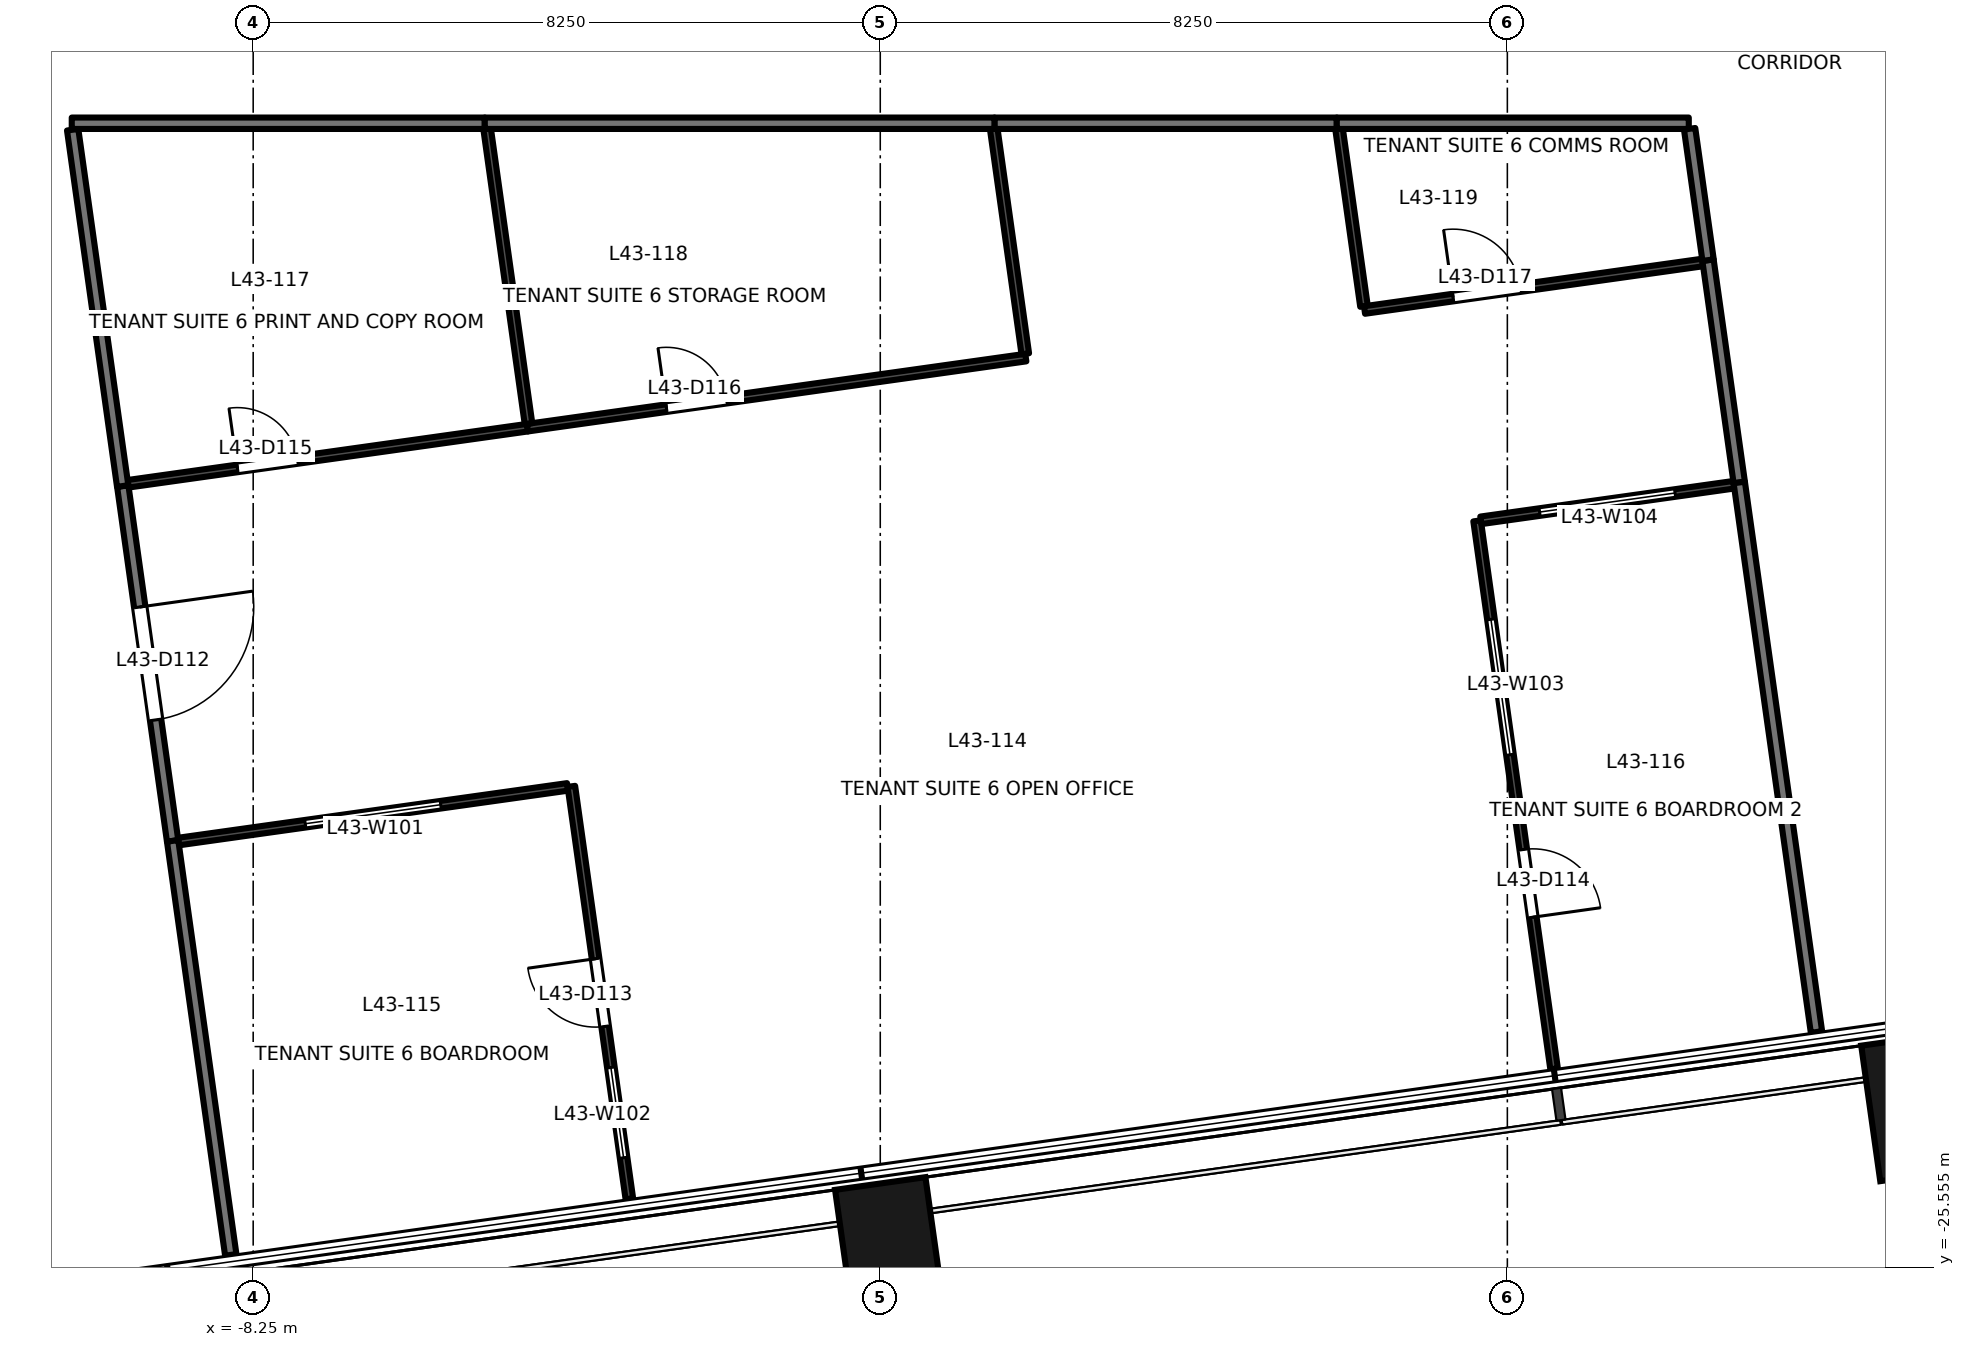
"""IFC4 building model, lengths in metres.
Left out: names, types, materials, properties, quantities, classifications, styles, units other than length and angle.
Written with IfcOpenShell. Run it as: python <this file> out.ifc"""

import sys

from ifc_helpers import new_model, si_unit, direction, frame, frame_2d, origin, origin_2d, place, context, subcontext, project, spatial, rectangle, extrude, element, fill, save


model = new_model("IFC4")
c1 = context("Model", 3, precision=1e-05, world=origin(), true_north=direction((0.0, 1.0)))
c2 = subcontext(c1, "Body", "Model", "MODEL_VIEW")
j1 = project(units=[si_unit("LENGTHUNIT", "METRE"), si_unit("PLANEANGLEUNIT", "RADIAN")], contexts=[c1])
p1 = place(None, origin())
s1 = spatial("IfcSite", under=j1, at=p1, CompositionType="ELEMENT")
p2 = place(p1, origin())
s2 = spatial("IfcBuilding", under=s1, at=p2, CompositionType="ELEMENT")
p3 = place(p2, frame((0.0, 0.0, 188.0)))
s3 = spatial("IfcBuildingStorey", under=s2, at=p3, CompositionType="ELEMENT", Elevation=188.0)
for number, where, z_axis, x_axis in (
    (1, (0.125, -25.34, -0.2), (0.0, 0.0, 1.0), (0.99, 0.139, 0.0)),
    (2, (13.625, -23.443, -0.2), (0.0, 0.0, 1.0), (0.99, 0.139, 0.0)),
):
    element("IfcColumn", number, at=place(p3, frame(where, z_axis=z_axis, x_axis=x_axis)), inside=s3, PredefinedType="COLUMN", context=c2, shape_type="SweptSolid", body=[
        extrude(rectangle(XDim=1.2, YDim=1.8, at=origin_2d()), origin(), (0.0, 0.0, 1.0), 3.9),
    ])
p4 = place(p3, frame((-9.966, -15.273, 0.0), z_axis=(0.0, 0.0, 1.0), x_axis=(0.139137407344, -0.990273084496, 0.0)))
e3 = element("IfcWall", 3, at=p4, inside=s3, PredefinedType="PARTITIONING", context=c2, shape_type="SweptSolid", body=[
    extrude(rectangle(XDim=4.715, YDim=0.15, at=frame_2d((2.357, 0.0))), origin(), (0.0, 0.0, 1.0), 3.7),
])
p5 = place(p4, frame((1.607, 0.0, 0.0)))
e4 = element("IfcOpeningElement", 4, at=p5, cuts=e3, PredefinedType="OPENING", context=c2, shape_type="SweptSolid", body=[
    extrude(rectangle(XDim=1.5, YDim=2.1, at=frame_2d((0.75, 1.05))), frame((0.0, 0.085, 0.0), z_axis=(0.0, -1.0, 0.0), x_axis=(1.0, 0.0, 0.0)), (0.0, 0.0, 1.0), 0.171),
])
p6 = place(p3, frame((6.006, -10.5, 0.0), z_axis=(0.0, 0.0, 1.0), x_axis=(-1.0, 0.0, 0.0)))
e5 = element("IfcWall", 5, at=p6, inside=s3, PredefinedType="PARTITIONING", context=c2, shape_type="SweptSolid", body=[
    extrude(rectangle(XDim=4.504, YDim=0.15, at=frame_2d((2.252, 0.0))), origin(), (0.0, 0.0, 1.0), 2.9),
])
p7 = place(p3, frame((11.301, -15.226, 0.0), z_axis=(0.0, 0.0, 1.0), x_axis=(-0.139233295347, 0.990259607107, 0.0)))
e6 = element("IfcWall", 6, at=p7, inside=s3, PredefinedType="PARTITIONING", context=c2, shape_type="SweptSolid", body=[
    extrude(rectangle(XDim=2.953, YDim=0.15, at=frame_2d((1.477, 0.0))), origin(), (0.0, 0.0, 1.0), 3.7),
])
p8 = place(p3, frame((-9.31, -19.941, 0.0), z_axis=(0.0, 0.0, 1.0), x_axis=(0.139103174181, -0.990277893792, 0.0)))
e7 = element("IfcWall", 7, at=p8, inside=s3, PredefinedType="PARTITIONING", context=c2, shape_type="SweptSolid", body=[
    extrude(rectangle(XDim=5.5, YDim=0.15, at=frame_2d((2.75, 0.0))), origin(), (0.0, 0.0, 1.0), 2.8),
])
p9 = place(p3, frame((12.317, -22.456, 0.0), z_axis=(0.0, 0.0, 1.0), x_axis=(-0.139141087095, 0.990272567469, 0.0)))
e8 = element("IfcWall", 8, at=p9, inside=s3, PredefinedType="PARTITIONING", context=c2, shape_type="SweptSolid", body=[
    extrude(rectangle(XDim=7.301, YDim=0.15, at=frame_2d((3.65, 0.0))), origin(), (0.0, 0.0, 1.0), 3.7),
])
p10 = place(p3, frame((-10.625, -10.585, 0.0), z_axis=(0.0, 0.0, 1.0), x_axis=(0.138987741071, -0.990294101685, 0.0)))
e9 = element("IfcWall", 9, at=p10, inside=s3, PredefinedType="PARTITIONING", context=c2, shape_type="SweptSolid", body=[
    extrude(rectangle(XDim=4.734, YDim=0.15, at=frame_2d((2.367, 0.0))), origin(), (0.0, 0.0, 1.0), 3.7),
])
p11 = place(p3, frame((-5.203, -10.5, 0.0), z_axis=(0.0, 0.0, 1.0), x_axis=(-1.0, 0.0, 0.0)))
e10 = element("IfcWall", 10, at=p11, inside=s3, PredefinedType="PARTITIONING", context=c2, shape_type="SweptSolid", body=[
    extrude(rectangle(XDim=5.434, YDim=0.15, at=frame_2d((2.717, 0.0))), origin(), (0.0, 0.0, 1.0), 2.8),
])
p12 = place(p3, frame((1.502, -10.5, 0.0), z_axis=(0.0, 0.0, 1.0), x_axis=(-1.0, 0.0, 0.0)))
e11 = element("IfcWall", 11, at=p12, inside=s3, PredefinedType="PARTITIONING", context=c2, shape_type="SweptSolid", body=[
    extrude(rectangle(XDim=6.705, YDim=0.15, at=frame_2d((3.353, 0.0))), origin(), (0.0, 0.0, 1.0), 2.9),
])
p13 = place(p3, frame((10.637, -10.5, 0.0), z_axis=(0.0, 0.0, 1.0), x_axis=(-1.0, 0.0, 0.0)))
e12 = element("IfcWall", 12, at=p13, inside=s3, PredefinedType="PARTITIONING", context=c2, shape_type="SweptSolid", body=[
    extrude(rectangle(XDim=4.631, YDim=0.15, at=frame_2d((2.315, 0.0))), origin(), (0.0, 0.0, 1.0), 3.0),
])
p14 = place(p3, frame((10.891, -12.301, 0.0), z_axis=(0.0, 0.0, 1.0), x_axis=(-0.139344862723, 0.990243914009, 0.0)))
e13 = element("IfcWall", 13, at=p14, inside=s3, PredefinedType="PARTITIONING", context=c2, shape_type="SweptSolid", body=[
    extrude(rectangle(XDim=1.745, YDim=0.15, at=frame_2d((0.873, 0.0))), origin(), (0.0, 0.0, 1.0), 3.7),
])
p15 = place(p3, frame((-4.114, -19.231, 0.0), z_axis=(0.0, 0.0, 1.0), x_axis=(-0.990279259335, -0.139093452508, 0.0)))
e14 = element("IfcWall", 14, at=p15, inside=s3, PredefinedType="PARTITIONING", context=c2, shape_type="SweptSolid", body=[
    extrude(rectangle(XDim=5.169, YDim=0.1, at=frame_2d((2.584, 0.0))), origin(), (0.0, 0.0, 1.0), 2.8),
])
p16 = place(p15, frame((1.685, 0.0, 0.9)))
e15 = element("IfcOpeningElement", 15, at=p16, cuts=e14, PredefinedType="OPENING", context=c2, shape_type="SweptSolid", body=[
    extrude(rectangle(XDim=1.8, YDim=1.2, at=frame_2d((0.9, 0.6))), frame((0.0, 0.061, 0.0), z_axis=(0.0, -1.0, 0.0), x_axis=(1.0, 0.0, 0.0)), (0.0, 0.0, 1.0), 0.121),
])
p17 = place(p3, frame((-3.301, -24.65, 0.0), z_axis=(0.0, 0.0, 1.0), x_axis=(-0.139243907894, 0.990258114894, 0.0)))
e16 = element("IfcWall", 16, at=p17, inside=s3, PredefinedType="PARTITIONING", context=c2, shape_type="SweptSolid", body=[
    extrude(rectangle(XDim=5.479, YDim=0.1, at=frame_2d((2.74, 0.0))), origin(), (0.0, 0.0, 1.0), 3.7),
])
p18 = place(p17, frame((2.29, 0.0, 0.0)))
e17 = element("IfcOpeningElement", 17, at=p18, cuts=e16, PredefinedType="OPENING", context=c2, shape_type="SweptSolid", body=[
    extrude(rectangle(XDim=0.9, YDim=2.1, at=frame_2d((0.45, 1.05))), frame((0.0, 0.061, 0.0), z_axis=(0.0, -1.0, 0.0), x_axis=(1.0, 0.0, 0.0)), (0.0, 0.0, 1.0), 0.121),
])
p19 = place(p17, frame((0.545, 0.0, 0.9)))
e18 = element("IfcOpeningElement", 18, at=p19, cuts=e16, PredefinedType="OPENING", context=c2, shape_type="SweptSolid", body=[
    extrude(rectangle(XDim=1.2, YDim=1.2, at=frame_2d((0.6, 0.6))), frame((0.0, 0.061, 0.0), z_axis=(0.0, -1.0, 0.0), x_axis=(1.0, 0.0, 0.0)), (0.0, 0.0, 1.0), 0.121),
])
p20 = place(p3, frame((7.852, -15.731, 0.0), z_axis=(0.0, 0.0, 1.0), x_axis=(0.139143839005, -0.9902721808, 0.0)))
e19 = element("IfcWall", 19, at=p20, inside=s3, PredefinedType="PARTITIONING", context=c2, shape_type="SweptSolid", body=[
    extrude(rectangle(XDim=7.28, YDim=0.1, at=frame_2d((3.64, 0.0))), origin(), (0.0, 0.0, 1.0), 3.0),
])
p21 = place(p20, frame((4.366, 0.0, 0.0)))
e20 = element("IfcOpeningElement", 20, at=p21, cuts=e19, PredefinedType="OPENING", context=c2, shape_type="SweptSolid", body=[
    extrude(rectangle(XDim=0.9, YDim=2.1, at=frame_2d((0.45, 1.05))), frame((0.0, 0.061, 0.0), z_axis=(0.0, -1.0, 0.0), x_axis=(1.0, 0.0, 0.0)), (0.0, 0.0, 1.0), 0.121),
])
p22 = place(p20, frame((1.308, 0.0, 0.9)))
e21 = element("IfcOpeningElement", 21, at=p22, cuts=e19, PredefinedType="OPENING", context=c2, shape_type="SweptSolid", body=[
    extrude(rectangle(XDim=1.8, YDim=1.2, at=frame_2d((0.9, 0.6))), frame((0.0, 0.061, 0.0), z_axis=(0.0, -1.0, 0.0), x_axis=(1.0, 0.0, 0.0)), (0.0, 0.0, 1.0), 0.121),
])
p23 = place(p3, frame((11.229, -15.256, 0.0), z_axis=(0.0, 0.0, 1.0), x_axis=(-0.990256578838, -0.139254831399, 0.0)))
e22 = element("IfcWall", 22, at=p23, inside=s3, PredefinedType="PARTITIONING", context=c2, shape_type="SweptSolid", body=[
    extrude(rectangle(XDim=3.361, YDim=0.1, at=frame_2d((1.68, 0.0))), origin(), (0.0, 0.0, 1.0), 3.0),
])
p24 = place(p23, frame((0.78, 0.0, 0.9)))
e23 = element("IfcOpeningElement", 23, at=p24, cuts=e22, PredefinedType="OPENING", context=c2, shape_type="SweptSolid", body=[
    extrude(rectangle(XDim=1.8, YDim=1.2, at=frame_2d((0.9, 0.6))), frame((0.0, 0.061, 0.0), z_axis=(0.0, -1.0, 0.0), x_axis=(1.0, 0.0, 0.0)), (0.0, 0.0, 1.0), 0.121),
])
p25 = place(p3, frame((-9.895, -15.243, 0.0), z_axis=(0.0, 0.0, 1.0), x_axis=(0.99027719117, 0.139108176064, 0.0)))
e24 = element("IfcWall", 24, at=p25, inside=s3, PredefinedType="PARTITIONING", context=c2, shape_type="SweptSolid", body=[
    extrude(rectangle(XDim=5.305, YDim=0.1, at=frame_2d((2.653, 0.0))), origin(), (0.0, 0.0, 1.0), 2.8),
])
p26 = place(p25, frame((1.452, 0.0, 0.0)))
e25 = element("IfcOpeningElement", 25, at=p26, cuts=e24, PredefinedType="OPENING", context=c2, shape_type="SweptSolid", body=[
    extrude(rectangle(XDim=0.8, YDim=2.1, at=frame_2d((0.4, 1.05))), frame((0.0, 0.061, 0.0), z_axis=(0.0, -1.0, 0.0), x_axis=(1.0, 0.0, 0.0)), (0.0, 0.0, 1.0), 0.121),
])
p27 = place(p3, frame((-4.641, -14.505, 0.0), z_axis=(0.0, 0.0, 1.0), x_axis=(0.990258326755, 0.1392424012, 0.0)))
e26 = element("IfcWall", 26, at=p27, inside=s3, PredefinedType="PARTITIONING", context=c2, shape_type="SweptSolid", body=[
    extrude(rectangle(XDim=6.621, YDim=0.1, at=frame_2d((3.31, 0.0))), origin(), (0.0, 0.0, 1.0), 2.9),
])
p28 = place(p27, frame((1.846, 0.0, 0.0)))
e27 = element("IfcOpeningElement", 27, at=p28, cuts=e26, PredefinedType="OPENING", context=c2, shape_type="SweptSolid", body=[
    extrude(rectangle(XDim=0.8, YDim=2.1, at=frame_2d((0.4, 1.05))), frame((0.0, 0.061, 0.0), z_axis=(0.0, -1.0, 0.0), x_axis=(1.0, 0.0, 0.0)), (0.0, 0.0, 1.0), 0.121),
])
p29 = place(p3, frame((1.908, -13.533, 0.0), z_axis=(0.0, 0.0, 1.0), x_axis=(-0.138954956276, 0.990298702476, 0.0)))
e28 = element("IfcWall", 28, at=p29, inside=s3, PredefinedType="PARTITIONING", context=c2, shape_type="SweptSolid", body=[
    extrude(rectangle(XDim=2.994, YDim=0.1, at=frame_2d((1.497, 0.0))), origin(), (0.0, 0.0, 1.0), 3.7),
])
p30 = place(p3, frame((6.035, -10.568, 0.0), z_axis=(0.0, 0.0, 1.0), x_axis=(0.139280161334, -0.990253016486, 0.0)))
e29 = element("IfcWall", 29, at=p30, inside=s3, PredefinedType="PARTITIONING", context=c2, shape_type="SweptSolid", body=[
    extrude(rectangle(XDim=2.363, YDim=0.1, at=frame_2d((1.181, 0.0))), origin(), (0.0, 0.0, 1.0), 3.7),
])
p31 = place(p3, frame((6.371, -12.957, 0.0), z_axis=(0.0, 0.0, 1.0), x_axis=(0.990271914732, 0.139145732571, 0.0)))
e30 = element("IfcWall", 30, at=p31, inside=s3, PredefinedType="PARTITIONING", context=c2, shape_type="SweptSolid", body=[
    extrude(rectangle(XDim=4.492, YDim=0.1, at=frame_2d((2.246, 0.0))), origin(), (0.0, 0.0, 1.0), 3.0),
])
p32 = place(p31, frame((1.177, 0.0, 0.0)))
e31 = element("IfcOpeningElement", 31, at=p32, cuts=e30, PredefinedType="OPENING", context=c2, shape_type="SweptSolid", body=[
    extrude(rectangle(XDim=0.9, YDim=2.1, at=frame_2d((0.45, 1.05))), frame((0.0, 0.061, 0.0), z_axis=(0.0, -1.0, 0.0), x_axis=(1.0, 0.0, 0.0)), (0.0, 0.0, 1.0), 0.121),
])
p33 = place(p3, frame((-5.173, -10.568, 0.0), z_axis=(0.0, 0.0, 1.0), x_axis=(0.139006835826, -0.990291421549, 0.0)))
e32 = element("IfcWall", 32, at=p33, inside=s3, PredefinedType="PARTITIONING", context=c2, shape_type="SweptSolid", body=[
    extrude(rectangle(XDim=3.922, YDim=0.1, at=frame_2d((1.961, 0.0))), origin(), (0.0, 0.0, 1.0), 2.9),
])
p34 = place(p5, origin())
e33 = element("IfcDoor", 33, at=p34, inside=s3, OperationType="DOUBLE_DOOR_SINGLE_SWING", PredefinedType="DOOR", context=c2, shape_type="SweptSolid", body=[
    extrude(rectangle(XDim=1.5, YDim=2.1, at=frame_2d((0.75, 1.05))), frame((0.0, 0.025, 0.0), z_axis=(0.0, -1.0, 0.0), x_axis=(1.0, 0.0, 0.0)), (0.0, 0.0, 1.0), 0.05),
])
fill(e4, e33)
p35 = place(p18, origin())
e34 = element("IfcDoor", 34, at=p35, inside=s3, OperationType="SINGLE_SWING_RIGHT", PredefinedType="DOOR", context=c2, shape_type="SweptSolid", body=[
    extrude(rectangle(XDim=0.9, YDim=2.1, at=frame_2d((0.45, 1.05))), frame((0.0, 0.025, 0.0), z_axis=(0.0, -1.0, 0.0), x_axis=(1.0, 0.0, 0.0)), (0.0, 0.0, 1.0), 0.05),
])
fill(e17, e34)
p36 = place(p21, origin())
e35 = element("IfcDoor", 35, at=p36, inside=s3, OperationType="SINGLE_SWING_RIGHT", PredefinedType="DOOR", context=c2, shape_type="SweptSolid", body=[
    extrude(rectangle(XDim=0.9, YDim=2.1, at=frame_2d((0.45, 1.05))), frame((0.0, 0.025, 0.0), z_axis=(0.0, -1.0, 0.0), x_axis=(1.0, 0.0, 0.0)), (0.0, 0.0, 1.0), 0.05),
])
fill(e20, e35)
p37 = place(p26, origin())
e36 = element("IfcDoor", 36, at=p37, inside=s3, OperationType="SINGLE_SWING_LEFT", PredefinedType="DOOR", context=c2, shape_type="SweptSolid", body=[
    extrude(rectangle(XDim=0.8, YDim=2.1, at=frame_2d((0.4, 1.05))), frame((0.0, 0.025, 0.0), z_axis=(0.0, -1.0, 0.0), x_axis=(1.0, 0.0, 0.0)), (0.0, 0.0, 1.0), 0.05),
])
fill(e25, e36)
p38 = place(p28, origin())
e37 = element("IfcDoor", 37, at=p38, inside=s3, OperationType="SINGLE_SWING_LEFT", PredefinedType="DOOR", context=c2, shape_type="SweptSolid", body=[
    extrude(rectangle(XDim=0.8, YDim=2.1, at=frame_2d((0.4, 1.05))), frame((0.0, 0.025, 0.0), z_axis=(0.0, -1.0, 0.0), x_axis=(1.0, 0.0, 0.0)), (0.0, 0.0, 1.0), 0.05),
])
fill(e27, e37)
p39 = place(p32, origin())
e38 = element("IfcDoor", 38, at=p39, inside=s3, OperationType="SINGLE_SWING_LEFT", PredefinedType="DOOR", context=c2, shape_type="SweptSolid", body=[
    extrude(rectangle(XDim=0.9, YDim=2.1, at=frame_2d((0.45, 1.05))), frame((0.0, 0.025, 0.0), z_axis=(0.0, -1.0, 0.0), x_axis=(1.0, 0.0, 0.0)), (0.0, 0.0, 1.0), 0.05),
])
fill(e31, e38)
p40 = place(p16, origin())
e39 = element("IfcWindow", 39, at=p40, inside=s3, PartitioningType="SINGLE_PANEL", PredefinedType="WINDOW", context=c2, shape_type="SweptSolid", body=[
    extrude(rectangle(XDim=1.8, YDim=1.2, at=frame_2d((0.9, 0.6))), frame((0.0, 0.03, 0.0), z_axis=(0.0, -1.0, 0.0), x_axis=(1.0, 0.0, 0.0)), (0.0, 0.0, 1.0), 0.06),
])
fill(e15, e39)
p41 = place(p19, origin())
e40 = element("IfcWindow", 40, at=p41, inside=s3, PartitioningType="SINGLE_PANEL", PredefinedType="WINDOW", context=c2, shape_type="SweptSolid", body=[
    extrude(rectangle(XDim=1.2, YDim=1.2, at=frame_2d((0.6, 0.6))), frame((0.0, 0.03, 0.0), z_axis=(0.0, -1.0, 0.0), x_axis=(1.0, 0.0, 0.0)), (0.0, 0.0, 1.0), 0.06),
])
fill(e18, e40)
p42 = place(p22, origin())
e41 = element("IfcWindow", 41, at=p42, inside=s3, PartitioningType="SINGLE_PANEL", PredefinedType="WINDOW", context=c2, shape_type="SweptSolid", body=[
    extrude(rectangle(XDim=1.8, YDim=1.2, at=frame_2d((0.9, 0.6))), frame((0.0, 0.03, 0.0), z_axis=(0.0, -1.0, 0.0), x_axis=(1.0, 0.0, 0.0)), (0.0, 0.0, 1.0), 0.06),
])
fill(e21, e41)
p43 = place(p24, origin())
e42 = element("IfcWindow", 42, at=p43, inside=s3, PartitioningType="SINGLE_PANEL", PredefinedType="WINDOW", context=c2, shape_type="SweptSolid", body=[
    extrude(rectangle(XDim=1.8, YDim=1.2, at=frame_2d((0.9, 0.6))), frame((0.0, 0.03, 0.0), z_axis=(0.0, -1.0, 0.0), x_axis=(1.0, 0.0, 0.0)), (0.0, 0.0, 1.0), 0.06),
])
fill(e23, e42)
save(model, sys.argv[1])
